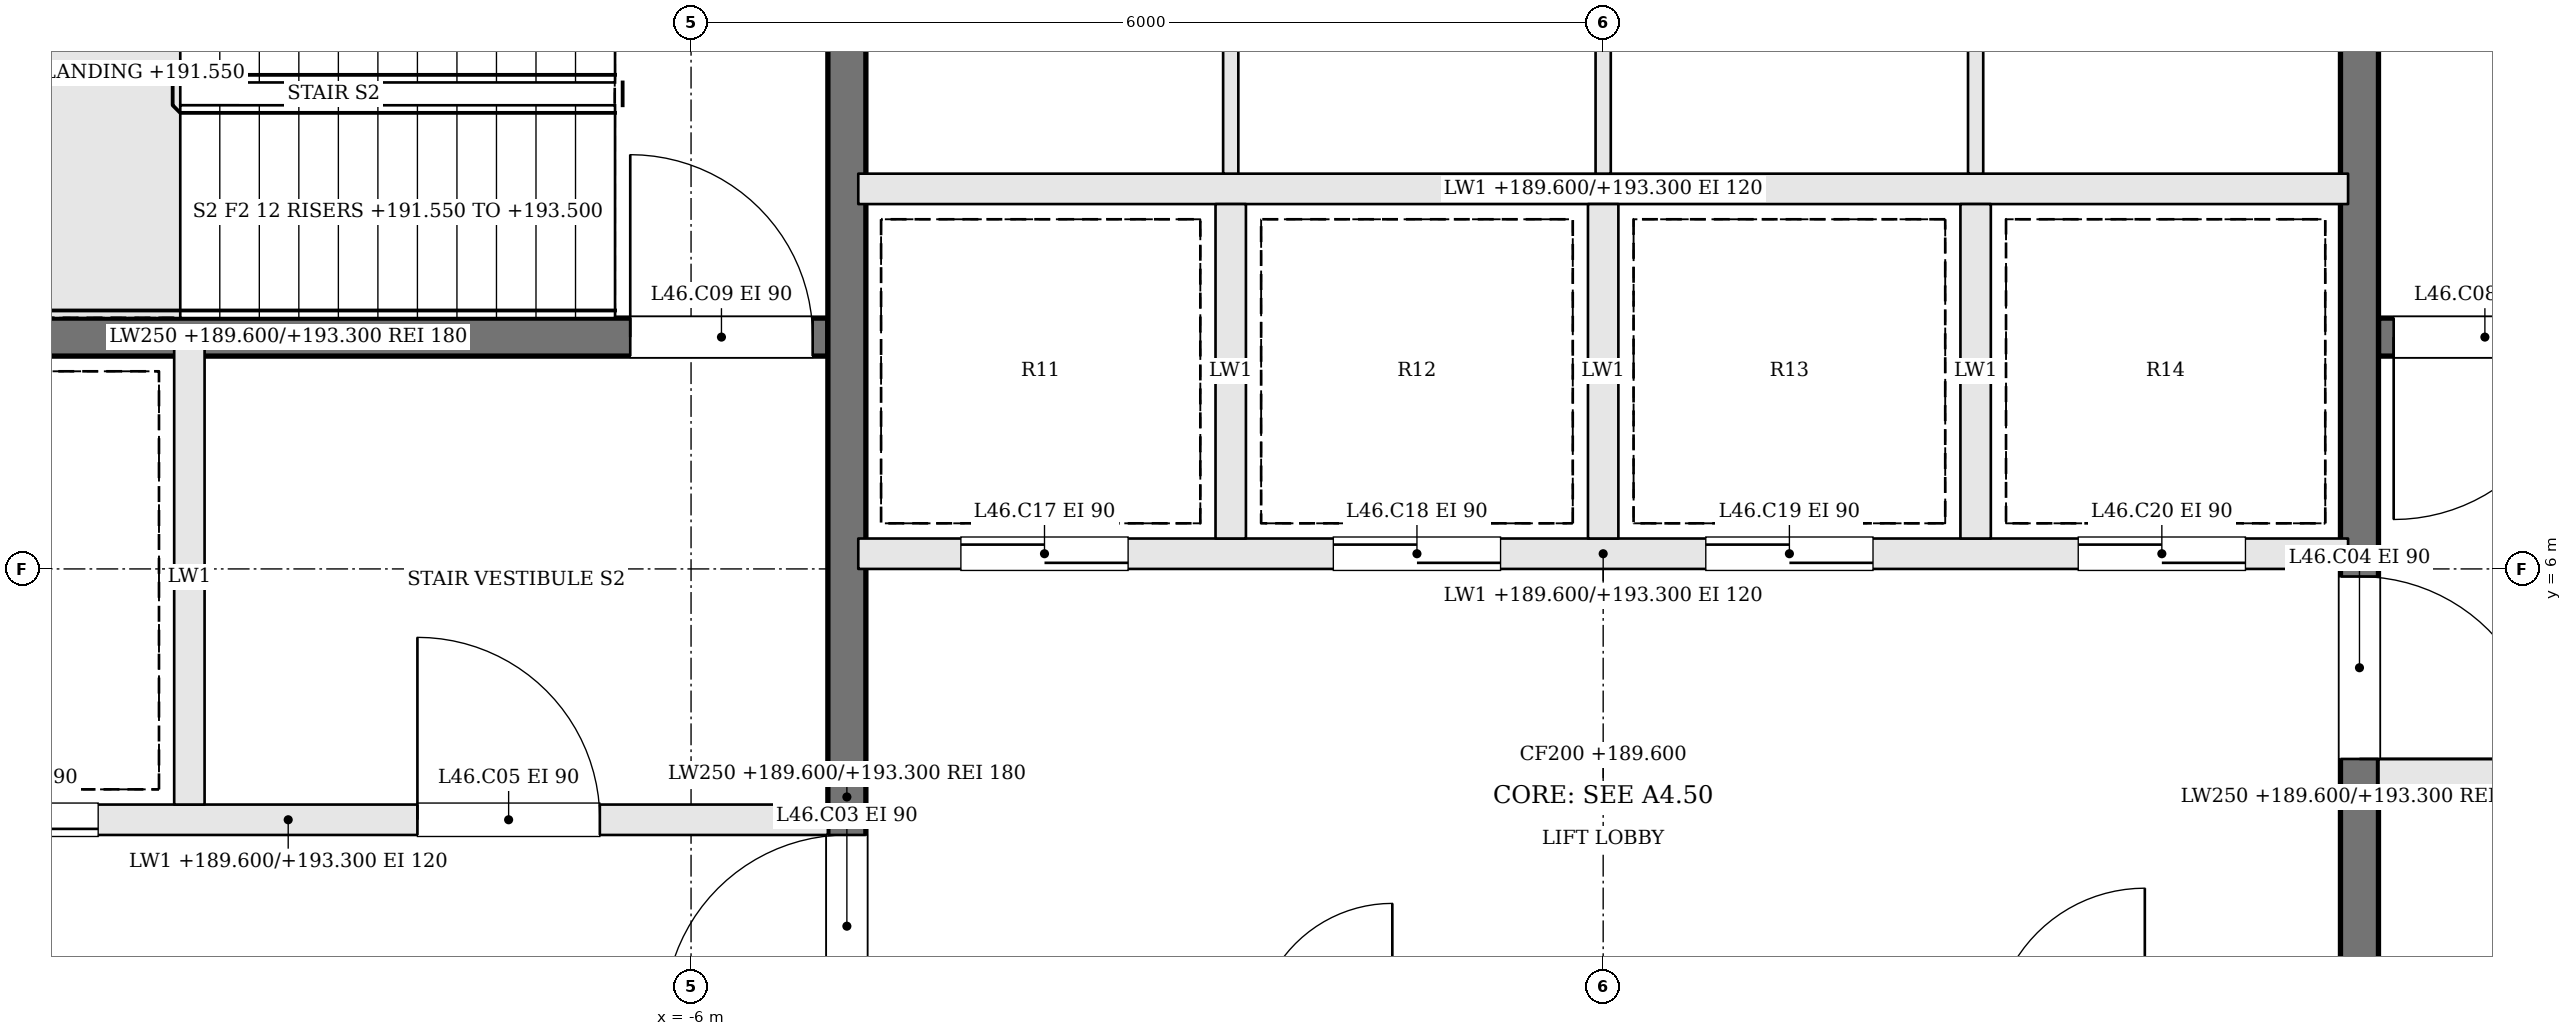
"""IFC4 building model, lengths in metres.
Left out: names, types, materials, properties, quantities, classifications, styles, units other than length and angle.
Written with IfcOpenShell. Run it as: python <this file> out.ifc"""

import sys

from ifc_helpers import new_model, si_unit, direction, frame, frame_2d, origin, place, context, subcontext, project, spatial, rectangle, extrude, element, fill, save


model = new_model("IFC4")
c1 = context("Model", 3, precision=1e-05, world=origin(), true_north=direction((0.0, 1.0)))
c2 = subcontext(c1, "Body", "Model", "MODEL_VIEW")
j1 = project(units=[si_unit("LENGTHUNIT", "METRE"), si_unit("PLANEANGLEUNIT", "RADIAN")], contexts=[c1])
p1 = place(None, origin())
s1 = spatial("IfcSite", under=j1, at=p1, CompositionType="ELEMENT")
p2 = place(p1, origin())
s2 = spatial("IfcBuilding", under=s1, at=p2, CompositionType="ELEMENT")
p3 = place(p2, frame((0.0, 0.0, 189.6)))
s3 = spatial("IfcBuildingStorey", under=s2, at=p3, CompositionType="ELEMENT", Elevation=189.6)
p4 = place(p3, frame((12.2, 7.525, 0.0), z_axis=(0.0, 0.0, 1.0), x_axis=(-1.0, 0.0, 0.0)))
e1 = element("IfcWall", 1, at=p4, inside=s3, PredefinedType="SOLIDWALL", context=c2, shape_type="SweptSolid", body=[
    extrude(rectangle(XDim=7.1, YDim=0.25, at=frame_2d((3.55, 0.0))), origin(), (0.0, 0.0, 1.0), 3.7),
])
p5 = place(p4, frame((5.8, 0.0, 0.0)))
e2 = element("IfcOpeningElement", 2, at=p5, cuts=e1, PredefinedType="OPENING", context=c2, shape_type="SweptSolid", body=[
    extrude(rectangle(XDim=1.2, YDim=2.1, at=frame_2d((0.6, 1.05))), frame((0.0, 0.135, 0.0), z_axis=(0.0, -1.0, 0.0), x_axis=(1.0, 0.0, 0.0)), (0.0, 0.0, 1.0), 0.27),
])
p6 = place(p3, frame((-12.2, 4.35, 0.0), z_axis=(0.0, 0.0, 1.0), x_axis=(1.0, 0.0, 0.0)))
e3 = element("IfcWall", 3, at=p6, inside=s3, PredefinedType="SOLIDWALL", context=c2, shape_type="SweptSolid", body=[
    extrude(rectangle(XDim=7.1, YDim=0.2, at=frame_2d((3.55, 0.0))), origin(), (0.0, 0.0, 1.0), 3.7),
])
p7 = place(p6, frame((4.4, 0.0, 0.0)))
e4 = element("IfcOpeningElement", 4, at=p7, cuts=e3, PredefinedType="OPENING", context=c2, shape_type="SweptSolid", body=[
    extrude(rectangle(XDim=1.2, YDim=2.1, at=frame_2d((0.6, 1.05))), frame((0.0, 0.11, 0.0), z_axis=(0.0, -1.0, 0.0), x_axis=(1.0, 0.0, 0.0)), (0.0, 0.0, 1.0), 0.22),
])
p8 = place(p6, frame((1.1, 0.0, 0.0)))
e5 = element("IfcOpeningElement", 5, at=p8, cuts=e3, PredefinedType="OPENING", context=c2, shape_type="SweptSolid", body=[
    extrude(rectangle(XDim=1.2, YDim=2.1, at=frame_2d((0.6, 1.05))), frame((0.0, 0.11, 0.0), z_axis=(0.0, -1.0, 0.0), x_axis=(1.0, 0.0, 0.0)), (0.0, 0.0, 1.0), 0.22),
])
p9 = place(p3, frame((12.2, 4.65, 0.0), z_axis=(0.0, 0.0, 1.0), x_axis=(-1.0, 0.0, 0.0)))
e6 = element("IfcWall", 6, at=p9, inside=s3, PredefinedType="SOLIDWALL", context=c2, shape_type="SweptSolid", body=[
    extrude(rectangle(XDim=7.1, YDim=0.2, at=frame_2d((3.55, 0.0))), origin(), (0.0, 0.0, 1.0), 3.7),
])
p10 = place(p9, frame((4.4, 0.0, 0.0)))
e7 = element("IfcOpeningElement", 7, at=p10, cuts=e6, PredefinedType="OPENING", context=c2, shape_type="SweptSolid", body=[
    extrude(rectangle(XDim=1.2, YDim=2.1, at=frame_2d((0.6, 1.05))), frame((0.0, 0.11, 0.0), z_axis=(0.0, -1.0, 0.0), x_axis=(1.0, 0.0, 0.0)), (0.0, 0.0, 1.0), 0.22),
])
p11 = place(p9, frame((1.1, 0.0, 0.0)))
e8 = element("IfcOpeningElement", 8, at=p11, cuts=e6, PredefinedType="OPENING", context=c2, shape_type="SweptSolid", body=[
    extrude(rectangle(XDim=1.2, YDim=2.1, at=frame_2d((0.6, 1.05))), frame((0.0, 0.11, 0.0), z_axis=(0.0, -1.0, 0.0), x_axis=(1.0, 0.0, 0.0)), (0.0, 0.0, 1.0), 0.22),
])
p12 = place(p3, frame((-12.2, 7.525, 0.0), z_axis=(0.0, 0.0, 1.0), x_axis=(1.0, 0.0, 0.0)))
e9 = element("IfcWall", 9, at=p12, inside=s3, PredefinedType="SOLIDWALL", context=c2, shape_type="SweptSolid", body=[
    extrude(rectangle(XDim=7.1, YDim=0.25, at=frame_2d((3.55, 0.0))), origin(), (0.0, 0.0, 1.0), 3.7),
])
p13 = place(p12, frame((5.8, 0.0, 0.0)))
e10 = element("IfcOpeningElement", 10, at=p13, cuts=e9, PredefinedType="OPENING", context=c2, shape_type="SweptSolid", body=[
    extrude(rectangle(XDim=1.2, YDim=2.1, at=frame_2d((0.6, 1.05))), frame((0.0, 0.135, 0.0), z_axis=(0.0, -1.0, 0.0), x_axis=(1.0, 0.0, 0.0)), (0.0, 0.0, 1.0), 0.27),
])
p14 = place(p3, frame((-9.3, 4.45, 0.0), z_axis=(0.0, 0.0, 1.0), x_axis=(0.0, 1.0, 0.0)))
e11 = element("IfcWall", 11, at=p14, inside=s3, PredefinedType="SOLIDWALL", context=c2, shape_type="SweptSolid", body=[
    extrude(rectangle(XDim=3.0, YDim=0.2, at=frame_2d((1.5, 0.0))), origin(), (0.0, 0.0, 1.0), 3.7),
])
p15 = place(p3, frame((-4.975, -2.2, 0.0), z_axis=(0.0, 0.0, 1.0), x_axis=(0.0, 1.0, 0.0)))
e12 = element("IfcWall", 12, at=p15, inside=s3, PredefinedType="SOLIDWALL", context=c2, shape_type="SweptSolid", body=[
    extrude(rectangle(XDim=13.4, YDim=0.25, at=frame_2d((6.7, 0.0))), origin(), (0.0, 0.0, 1.0), 3.7),
])
p16 = place(p15, frame((5.25, 0.0, 0.0)))
e13 = element("IfcOpeningElement", 13, at=p16, cuts=e12, PredefinedType="OPENING", context=c2, shape_type="SweptSolid", body=[
    extrude(rectangle(XDim=1.2, YDim=2.1, at=frame_2d((0.6, 1.05))), frame((0.0, 0.135, 0.0), z_axis=(0.0, -1.0, 0.0), x_axis=(1.0, 0.0, 0.0)), (0.0, 0.0, 1.0), 0.27),
])
p17 = place(p3, frame((4.975, 11.2, 0.0), z_axis=(0.0, 0.0, 1.0), x_axis=(0.0, -1.0, 0.0)))
e14 = element("IfcWall", 14, at=p17, inside=s3, PredefinedType="SOLIDWALL", context=c2, shape_type="SweptSolid", body=[
    extrude(rectangle(XDim=13.4, YDim=0.25, at=frame_2d((6.7, 0.0))), origin(), (0.0, 0.0, 1.0), 3.7),
])
p18 = place(p17, frame((5.25, 0.0, 0.0)))
e15 = element("IfcOpeningElement", 15, at=p18, cuts=e14, PredefinedType="OPENING", context=c2, shape_type="SweptSolid", body=[
    extrude(rectangle(XDim=1.2, YDim=2.1, at=frame_2d((0.6, 1.05))), frame((0.0, 0.135, 0.0), z_axis=(0.0, -1.0, 0.0), x_axis=(1.0, 0.0, 0.0)), (0.0, 0.0, 1.0), 0.27),
])
p19 = place(p3, frame((-4.9, 6.1, 0.0), z_axis=(0.0, 0.0, 1.0), x_axis=(1.0, 0.0, 0.0)))
e16 = element("IfcWall", 16, at=p19, inside=s3, PredefinedType="SOLIDWALL", context=c2, shape_type="SweptSolid", body=[
    extrude(rectangle(XDim=9.8, YDim=0.2, at=frame_2d((4.9, 0.0))), origin(), (0.0, 0.0, 1.0), 3.7),
])
p20 = place(p19, frame((0.675, 0.0, 0.0)))
e17 = element("IfcOpeningElement", 17, at=p20, cuts=e16, PredefinedType="OPENING", context=c2, shape_type="SweptSolid", body=[
    extrude(rectangle(XDim=1.1, YDim=2.1, at=frame_2d((0.55, 1.05))), frame((0.0, 0.11, 0.0), z_axis=(0.0, -1.0, 0.0), x_axis=(1.0, 0.0, 0.0)), (0.0, 0.0, 1.0), 0.22),
])
p21 = place(p19, frame((3.125, 0.0, 0.0)))
e18 = element("IfcOpeningElement", 18, at=p21, cuts=e16, PredefinedType="OPENING", context=c2, shape_type="SweptSolid", body=[
    extrude(rectangle(XDim=1.1, YDim=2.1, at=frame_2d((0.55, 1.05))), frame((0.0, 0.11, 0.0), z_axis=(0.0, -1.0, 0.0), x_axis=(1.0, 0.0, 0.0)), (0.0, 0.0, 1.0), 0.22),
])
p22 = place(p19, frame((5.575, 0.0, 0.0)))
e19 = element("IfcOpeningElement", 19, at=p22, cuts=e16, PredefinedType="OPENING", context=c2, shape_type="SweptSolid", body=[
    extrude(rectangle(XDim=1.1, YDim=2.1, at=frame_2d((0.55, 1.05))), frame((0.0, 0.11, 0.0), z_axis=(0.0, -1.0, 0.0), x_axis=(1.0, 0.0, 0.0)), (0.0, 0.0, 1.0), 0.22),
])
p23 = place(p19, frame((8.025, 0.0, 0.0)))
e20 = element("IfcOpeningElement", 20, at=p23, cuts=e16, PredefinedType="OPENING", context=c2, shape_type="SweptSolid", body=[
    extrude(rectangle(XDim=1.1, YDim=2.1, at=frame_2d((0.55, 1.05))), frame((0.0, 0.11, 0.0), z_axis=(0.0, -1.0, 0.0), x_axis=(1.0, 0.0, 0.0)), (0.0, 0.0, 1.0), 0.22),
])
p24 = place(p3, frame((-4.9, 8.5, 0.0), z_axis=(0.0, 0.0, 1.0), x_axis=(1.0, 0.0, 0.0)))
e21 = element("IfcWall", 21, at=p24, inside=s3, PredefinedType="SOLIDWALL", context=c2, shape_type="SweptSolid", body=[
    extrude(rectangle(XDim=9.8, YDim=0.2, at=frame_2d((4.9, 0.0))), origin(), (0.0, 0.0, 1.0), 3.7),
])
for number, where, z_axis, x_axis in (
    (22, (-2.45, 6.2, 0.0), (0.0, 0.0, 1.0), (0.0, 1.0, 0.0)),
    (23, (0.0, 6.2, 0.0), (0.0, 0.0, 1.0), (0.0, 1.0, 0.0)),
    (24, (2.45, 6.2, 0.0), (0.0, 0.0, 1.0), (0.0, 1.0, 0.0)),
):
    element("IfcWall", number, at=place(p3, frame(where, z_axis=z_axis, x_axis=x_axis)), inside=s3, PredefinedType="SOLIDWALL", context=c2, shape_type="SweptSolid", body=[
        extrude(rectangle(XDim=2.2, YDim=0.2, at=frame_2d((1.1, 0.0))), origin(), (0.0, 0.0, 1.0), 3.7),
    ])
for number, where, z_axis, x_axis in (
    (25, (-2.45, 8.6, 0.0), (0.0, 0.0, 1.0), (0.0, 1.0, 0.0)),
    (26, (0.0, 8.6, 0.0), (0.0, 0.0, 1.0), (0.0, 1.0, 0.0)),
    (27, (2.45, 8.6, 0.0), (0.0, 0.0, 1.0), (0.0, 1.0, 0.0)),
):
    element("IfcWall", number, at=place(p3, frame(where, z_axis=z_axis, x_axis=x_axis)), inside=s3, PredefinedType="PARTITIONING", context=c2, shape_type="SweptSolid", body=[
        extrude(rectangle(XDim=2.6, YDim=0.1, at=frame_2d((1.3, 0.0))), origin(), (0.0, 0.0, 1.0), 3.7),
    ])
p25 = place(p16, origin())
e28 = element("IfcDoor", 28, at=p25, inside=s3, OperationType="SINGLE_SWING_LEFT", PredefinedType="DOOR", context=c2, shape_type="SweptSolid", body=[
    extrude(rectangle(XDim=1.2, YDim=2.1, at=frame_2d((0.6, 1.05))), frame((0.0, 0.025, 0.0), z_axis=(0.0, -1.0, 0.0), x_axis=(1.0, 0.0, 0.0)), (0.0, 0.0, 1.0), 0.05),
])
fill(e13, e28)
p26 = place(p18, origin())
e29 = element("IfcDoor", 29, at=p26, inside=s3, OperationType="SINGLE_SWING_RIGHT", PredefinedType="DOOR", context=c2, shape_type="SweptSolid", body=[
    extrude(rectangle(XDim=1.2, YDim=2.1, at=frame_2d((0.6, 1.05))), frame((0.0, 0.025, 0.0), z_axis=(0.0, -1.0, 0.0), x_axis=(1.0, 0.0, 0.0)), (0.0, 0.0, 1.0), 0.05),
])
fill(e15, e29)
p27 = place(p7, origin())
e30 = element("IfcDoor", 30, at=p27, inside=s3, OperationType="SINGLE_SWING_LEFT", PredefinedType="DOOR", context=c2, shape_type="SweptSolid", body=[
    extrude(rectangle(XDim=1.2, YDim=2.1, at=frame_2d((0.6, 1.05))), frame((0.0, 0.025, 0.0), z_axis=(0.0, -1.0, 0.0), x_axis=(1.0, 0.0, 0.0)), (0.0, 0.0, 1.0), 0.05),
])
fill(e4, e30)
p28 = place(p5, origin())
e31 = element("IfcDoor", 31, at=p28, inside=s3, OperationType="SINGLE_SWING_RIGHT", PredefinedType="DOOR", context=c2, shape_type="SweptSolid", body=[
    extrude(rectangle(XDim=1.2, YDim=2.1, at=frame_2d((0.6, 1.05))), frame((0.0, 0.025, 0.0), z_axis=(0.0, -1.0, 0.0), x_axis=(1.0, 0.0, 0.0)), (0.0, 0.0, 1.0), 0.05),
])
fill(e2, e31)
p29 = place(p13, origin())
e32 = element("IfcDoor", 32, at=p29, inside=s3, OperationType="SINGLE_SWING_LEFT", PredefinedType="DOOR", context=c2, shape_type="SweptSolid", body=[
    extrude(rectangle(XDim=1.2, YDim=2.1, at=frame_2d((0.6, 1.05))), frame((0.0, 0.025, 0.0), z_axis=(0.0, -1.0, 0.0), x_axis=(1.0, 0.0, 0.0)), (0.0, 0.0, 1.0), 0.05),
])
fill(e10, e32)
p30 = place(p8, origin())
e33 = element("IfcDoor", 33, at=p30, inside=s3, OperationType="SLIDING_TO_RIGHT", PredefinedType="DOOR", context=c2, shape_type="SweptSolid", body=[
    extrude(rectangle(XDim=1.2, YDim=2.1, at=frame_2d((0.6, 1.05))), frame((0.0, 0.025, 0.0), z_axis=(0.0, -1.0, 0.0), x_axis=(1.0, 0.0, 0.0)), (0.0, 0.0, 1.0), 0.05),
])
fill(e5, e33)
p31 = place(p20, origin())
e34 = element("IfcDoor", 34, at=p31, inside=s3, OperationType="SLIDING_TO_RIGHT", PredefinedType="DOOR", context=c2, shape_type="SweptSolid", body=[
    extrude(rectangle(XDim=1.1, YDim=2.1, at=frame_2d((0.55, 1.05))), frame((0.0, 0.025, 0.0), z_axis=(0.0, -1.0, 0.0), x_axis=(1.0, 0.0, 0.0)), (0.0, 0.0, 1.0), 0.05),
])
fill(e17, e34)
p32 = place(p21, origin())
e35 = element("IfcDoor", 35, at=p32, inside=s3, OperationType="SLIDING_TO_LEFT", PredefinedType="DOOR", context=c2, shape_type="SweptSolid", body=[
    extrude(rectangle(XDim=1.1, YDim=2.1, at=frame_2d((0.55, 1.05))), frame((0.0, 0.025, 0.0), z_axis=(0.0, -1.0, 0.0), x_axis=(1.0, 0.0, 0.0)), (0.0, 0.0, 1.0), 0.05),
])
fill(e18, e35)
p33 = place(p22, origin())
e36 = element("IfcDoor", 36, at=p33, inside=s3, OperationType="SLIDING_TO_RIGHT", PredefinedType="DOOR", context=c2, shape_type="SweptSolid", body=[
    extrude(rectangle(XDim=1.1, YDim=2.1, at=frame_2d((0.55, 1.05))), frame((0.0, 0.025, 0.0), z_axis=(0.0, -1.0, 0.0), x_axis=(1.0, 0.0, 0.0)), (0.0, 0.0, 1.0), 0.05),
])
fill(e19, e36)
p34 = place(p23, origin())
e37 = element("IfcDoor", 37, at=p34, inside=s3, OperationType="SLIDING_TO_LEFT", PredefinedType="DOOR", context=c2, shape_type="SweptSolid", body=[
    extrude(rectangle(XDim=1.1, YDim=2.1, at=frame_2d((0.55, 1.05))), frame((0.0, 0.025, 0.0), z_axis=(0.0, -1.0, 0.0), x_axis=(1.0, 0.0, 0.0)), (0.0, 0.0, 1.0), 0.05),
])
fill(e20, e37)
save(model, sys.argv[1])
